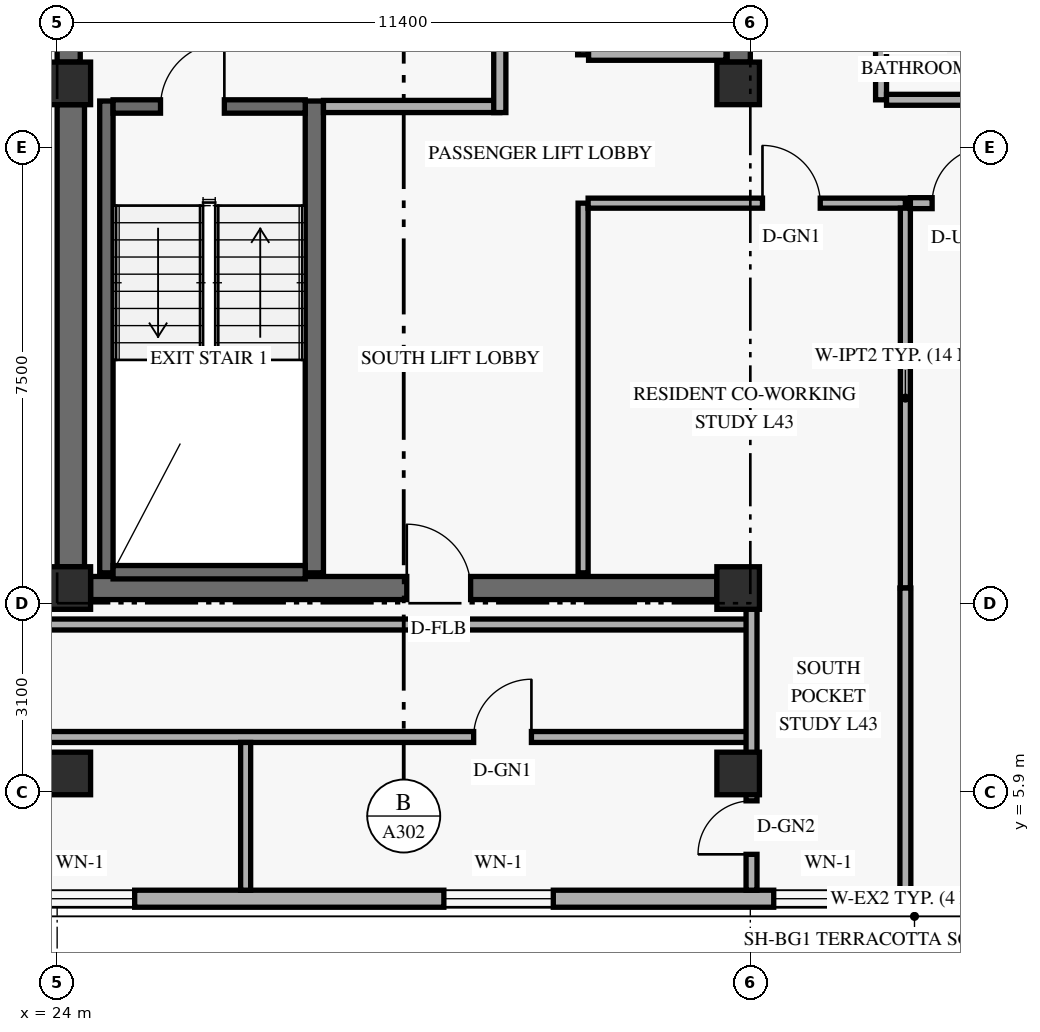
"""IFC4 building model, lengths in metres.
Left out: names, types, materials, properties, quantities, classifications, styles, units other than length and angle.
Written with IfcOpenShell. Run it as: python <this file> out.ifc"""

import sys

from ifc_helpers import new_model, si_unit, direction, frame, frame_2d, origin, origin_2d, place, context, subcontext, project, spatial, rectangle, extrude, element, fill, save


model = new_model("IFC4")
c1 = context("Model", 3, precision=1e-05, world=origin(), true_north=direction((0.0, 1.0)))
c2 = subcontext(c1, "Body", "Model", "MODEL_VIEW")
j1 = project(units=[si_unit("LENGTHUNIT", "METRE"), si_unit("PLANEANGLEUNIT", "RADIAN")], contexts=[c1])
p1 = place(None, origin())
s1 = spatial("IfcSite", under=j1, at=p1, CompositionType="ELEMENT")
p2 = place(p1, origin())
s2 = spatial("IfcBuilding", under=s1, at=p2, CompositionType="ELEMENT")
p3 = place(p2, frame((0.0, 0.0, 166.2)))
s3 = spatial("IfcBuildingStorey", under=s2, at=p3, CompositionType="ELEMENT", Elevation=166.2)
p4 = place(p3, frame((24.225, 9.6, 0.0), z_axis=(0.0, 0.0, 1.0), x_axis=(0.0, 1.0, 0.0)))
e1 = element("IfcWall", 1, at=p4, inside=s3, PredefinedType="SHEAR", context=c2, shape_type="SweptSolid", body=[
    extrude(rectangle(XDim=7.6, YDim=0.45, at=frame_2d((3.8, 0.0))), origin(), (0.0, 0.0, 1.0), 2.748),
])
p5 = place(p3, frame((24.19, 17.9, 0.0), z_axis=(0.0, 0.0, 1.0), x_axis=(0.0, 1.0, 0.0)))
e2 = element("IfcWall", 2, at=p5, inside=s3, PredefinedType="SHEAR", context=c2, shape_type="SweptSolid", body=[
    extrude(rectangle(XDim=11.95, YDim=0.38, at=frame_2d((5.975, 0.0))), origin(), (0.0, 0.0, 1.0), 2.748),
])
p6 = place(p3, frame((35.21, 17.9, 0.0), z_axis=(0.0, 0.0, 1.0), x_axis=(0.0, 1.0, 0.0)))
e3 = element("IfcWall", 3, at=p6, inside=s3, PredefinedType="SHEAR", context=c2, shape_type="SweptSolid", body=[
    extrude(rectangle(XDim=10.2, YDim=0.38, at=frame_2d((5.1, 0.0))), origin(), (0.0, 0.0, 1.0), 2.748),
])
p7 = place(p3, frame((24.55, 9.25, 0.0), z_axis=(0.0, 0.0, 1.0), x_axis=(1.0, 0.0, 0.0)))
e4 = element("IfcWall", 4, at=p7, inside=s3, PredefinedType="SHEAR", context=c2, shape_type="SweptSolid", body=[
    extrude(rectangle(XDim=10.3, YDim=0.38, at=frame_2d((5.15, 0.0))), origin(), (0.0, 0.0, 1.0), 3.36),
])
p8 = place(p7, frame((5.2, 0.0, 0.0)))
e5 = element("IfcOpeningElement", 5, at=p8, cuts=e4, PredefinedType="OPENING", context=c2, shape_type="SweptSolid", body=[
    extrude(rectangle(XDim=1.05, YDim=2.15, at=frame_2d((0.525, 1.075))), frame((0.0, 0.2, 0.0), z_axis=(0.0, -1.0, 0.0), x_axis=(1.0, 0.0, 0.0)), (0.0, 0.0, 1.0), 0.4),
])
p9 = place(p3, frame((24.81, 9.5, 0.0), z_axis=(0.0, 0.0, 1.0), x_axis=(0.0, 1.0, 0.0)))
e6 = element("IfcWall", 6, at=p9, inside=s3, PredefinedType="SHEAR", context=c2, shape_type="SweptSolid", body=[
    extrude(rectangle(XDim=7.76, YDim=0.22, at=frame_2d((3.88, 0.0))), origin(), (0.0, 0.0, 1.0), 3.36),
])
p10 = place(p3, frame((28.23, 9.5, 0.0), z_axis=(0.0, 0.0, 1.0), x_axis=(0.0, 1.0, 0.0)))
e7 = element("IfcWall", 7, at=p10, inside=s3, PredefinedType="SHEAR", context=c2, shape_type="SweptSolid", body=[
    extrude(rectangle(XDim=7.76, YDim=0.3, at=frame_2d((3.88, 0.0))), origin(), (0.0, 0.0, 1.0), 3.36),
])
p11 = place(p3, frame((24.92, 9.51, 0.0), z_axis=(0.0, 0.0, 1.0), x_axis=(1.0, 0.0, 0.0)))
e8 = element("IfcWall", 8, at=p11, inside=s3, PredefinedType="SHEAR", context=c2, shape_type="SweptSolid", body=[
    extrude(rectangle(XDim=3.16, YDim=0.22, at=frame_2d((1.58, 0.0))), origin(), (0.0, 0.0, 1.0), 3.36),
])
p12 = place(p3, frame((24.92, 17.17, 0.0), z_axis=(0.0, 0.0, 1.0), x_axis=(1.0, 0.0, 0.0)))
e9 = element("IfcWall", 9, at=p12, inside=s3, PredefinedType="SHEAR", context=c2, shape_type="SweptSolid", body=[
    extrude(rectangle(XDim=3.16, YDim=0.22, at=frame_2d((1.58, 0.0))), origin(), (0.0, 0.0, 1.0), 3.36),
])
p13 = place(p12, frame((0.78, 0.0, 0.0)))
e10 = element("IfcOpeningElement", 10, at=p13, cuts=e9, PredefinedType="OPENING", context=c2, shape_type="SweptSolid", body=[
    extrude(rectangle(XDim=1.05, YDim=2.15, at=frame_2d((0.525, 1.075))), frame((0.0, 0.12, 0.0), z_axis=(0.0, -1.0, 0.0), x_axis=(1.0, 0.0, 0.0)), (0.0, 0.0, 1.0), 0.24),
])
for number, where, z_axis, x_axis in (
    (11, (24.2, 6.2, 0.0), (0.0, 0.0, 1.0), (1.0, 0.0, 0.0)),
    (12, (24.2, 9.25, 0.0), (0.0, 0.0, 1.0), (1.0, 0.0, 0.0)),
    (13, (24.2, 17.55, 0.0), (0.0, 0.0, 1.0), (1.0, 0.0, 0.0)),
    (14, (35.2, 6.2, 0.0), (0.0, 0.0, 1.0), (1.0, 0.0, 0.0)),
    (15, (35.2, 9.25, 0.0), (0.0, 0.0, 1.0), (1.0, 0.0, 0.0)),
    (16, (35.2, 17.55, 0.0), (0.0, 0.0, 1.0), (1.0, 0.0, 0.0)),
):
    element("IfcColumn", number, at=place(p3, frame(where, z_axis=z_axis, x_axis=x_axis)), inside=s3, PredefinedType="COLUMN", context=c2, shape_type="SweptSolid", body=[
        extrude(rectangle(XDim=0.7, YDim=0.7, at=origin_2d()), origin(), (0.0, 0.0, 1.0), 3.6),
    ])
p14 = place(p3, frame((21.22, 4.14, 0.0), z_axis=(0.0, 0.0, 1.0), x_axis=(1.0, 0.0, 0.0)))
e17 = element("IfcWall", 17, at=p14, inside=s3, PredefinedType="SOLIDWALL", context=c2, shape_type="SweptSolid", body=[
    extrude(rectangle(XDim=33.76, YDim=0.28, at=frame_2d((16.88, 0.0))), origin(), (0.0, 0.0, 1.0), 3.36),
])
p15 = place(p14, frame((2.255, 0.0, 0.85)))
e18 = element("IfcOpeningElement", 18, at=p15, cuts=e17, PredefinedType="OPENING", context=c2, shape_type="SweptSolid", body=[
    extrude(rectangle(XDim=1.8, YDim=1.6, at=frame_2d((0.9, 0.8))), frame((0.0, 0.15, 0.0), z_axis=(0.0, -1.0, 0.0), x_axis=(1.0, 0.0, 0.0)), (0.0, 0.0, 1.0), 0.3),
])
p16 = place(p14, frame((9.14, 0.0, 0.85)))
e19 = element("IfcOpeningElement", 19, at=p16, cuts=e17, PredefinedType="OPENING", context=c2, shape_type="SweptSolid", body=[
    extrude(rectangle(XDim=1.8, YDim=1.6, at=frame_2d((0.9, 0.8))), frame((0.0, 0.15, 0.0), z_axis=(0.0, -1.0, 0.0), x_axis=(1.0, 0.0, 0.0)), (0.0, 0.0, 1.0), 0.3),
])
p17 = place(p14, frame((14.565, 0.0, 0.85)))
e20 = element("IfcOpeningElement", 20, at=p17, cuts=e17, PredefinedType="OPENING", context=c2, shape_type="SweptSolid", body=[
    extrude(rectangle(XDim=1.8, YDim=1.6, at=frame_2d((0.9, 0.8))), frame((0.0, 0.15, 0.0), z_axis=(0.0, -1.0, 0.0), x_axis=(1.0, 0.0, 0.0)), (0.0, 0.0, 1.0), 0.3),
])
p18 = place(p14, frame((20.088, 0.0, 0.85)))
e21 = element("IfcOpeningElement", 21, at=p18, cuts=e17, PredefinedType="OPENING", context=c2, shape_type="SweptSolid", body=[
    extrude(rectangle(XDim=1.8, YDim=1.6, at=frame_2d((0.9, 0.8))), frame((0.0, 0.15, 0.0), z_axis=(0.0, -1.0, 0.0), x_axis=(1.0, 0.0, 0.0)), (0.0, 0.0, 1.0), 0.3),
])
p19 = place(p14, frame((25.546, 0.0, 0.85)))
e22 = element("IfcOpeningElement", 22, at=p19, cuts=e17, PredefinedType="OPENING", context=c2, shape_type="SweptSolid", body=[
    extrude(rectangle(XDim=1.2, YDim=1.5, at=frame_2d((0.6, 0.75))), frame((0.0, 0.15, 0.0), z_axis=(0.0, -1.0, 0.0), x_axis=(1.0, 0.0, 0.0)), (0.0, 0.0, 1.0), 0.3),
])
p20 = place(p14, frame((29.503, 0.0, 0.85)))
e23 = element("IfcOpeningElement", 23, at=p20, cuts=e17, PredefinedType="OPENING", context=c2, shape_type="SweptSolid", body=[
    extrude(rectangle(XDim=1.8, YDim=1.6, at=frame_2d((0.9, 0.8))), frame((0.0, 0.15, 0.0), z_axis=(0.0, -1.0, 0.0), x_axis=(1.0, 0.0, 0.0)), (0.0, 0.0, 1.0), 0.3),
])
p21 = place(p3, frame((28.38, 17.17, 0.0), z_axis=(0.0, 0.0, 1.0), x_axis=(1.0, 0.0, 0.0)))
e24 = element("IfcWall", 24, at=p21, inside=s3, PredefinedType="STANDARD", context=c2, shape_type="SweptSolid", body=[
    extrude(rectangle(XDim=2.9, YDim=0.2, at=frame_2d((1.45, 0.0))), origin(), (0.0, 0.0, 1.0), 3.36),
])
p22 = place(p3, frame((31.28, 17.07, 0.0), z_axis=(0.0, 0.0, 1.0), x_axis=(0.0, 1.0, 0.0)))
e25 = element("IfcWall", 25, at=p22, inside=s3, PredefinedType="STANDARD", context=c2, shape_type="SweptSolid", body=[
    extrude(rectangle(XDim=3.92, YDim=0.2, at=frame_2d((1.96, 0.0))), origin(), (0.0, 0.0, 1.0), 2.73),
])
p23 = place(p22, frame((1.35, 0.0, 0.0)))
e26 = element("IfcOpeningElement", 26, at=p23, cuts=e25, PredefinedType="OPENING", context=c2, shape_type="SweptSolid", body=[
    extrude(rectangle(XDim=1.2, YDim=2.15, at=frame_2d((0.6, 1.075))), frame((0.0, 0.11, 0.0), z_axis=(0.0, -1.0, 0.0), x_axis=(1.0, 0.0, 0.0)), (0.0, 0.0, 1.0), 0.22),
])
p24 = place(p3, frame((32.65, 18.02, 0.0), z_axis=(0.0, 0.0, 1.0), x_axis=(0.0, 1.0, 0.0)))
e27 = element("IfcWall", 27, at=p24, inside=s3, PredefinedType="STANDARD", context=c2, shape_type="SweptSolid", body=[
    extrude(rectangle(XDim=10.06, YDim=0.18, at=frame_2d((5.03, 0.0))), origin(), (0.0, 0.0, 1.0), 3.36),
])
p25 = place(p3, frame((32.74, 18.02, 0.0), z_axis=(0.0, 0.0, 1.0), x_axis=(1.0, 0.0, 0.0)))
e28 = element("IfcWall", 28, at=p25, inside=s3, PredefinedType="STANDARD", context=c2, shape_type="SweptSolid", body=[
    extrude(rectangle(XDim=2.26, YDim=0.18, at=frame_2d((1.13, 0.0))), origin(), (0.0, 0.0, 1.0), 3.36),
])
p26 = place(p3, frame((32.65, 9.5, 0.0), z_axis=(0.0, 0.0, 1.0), x_axis=(0.0, 1.0, 0.0)))
e29 = element("IfcWall", 29, at=p26, inside=s3, PredefinedType="PARTITIONING", context=c2, shape_type="SweptSolid", body=[
    extrude(rectangle(XDim=6.08, YDim=0.165, at=frame_2d((3.04, 0.0))), origin(), (0.0, 0.0, 1.0), 3.36),
])
p27 = place(p3, frame((32.732, 15.58, 0.0), z_axis=(0.0, 0.0, 1.0), x_axis=(1.0, 0.0, 0.0)))
e30 = element("IfcWall", 30, at=p27, inside=s3, PredefinedType="PARTITIONING", context=c2, shape_type="SweptSolid", body=[
    extrude(rectangle(XDim=5.218, YDim=0.165, at=frame_2d((2.609, 0.0))), origin(), (0.0, 0.0, 1.0), 2.73),
])
p28 = place(p27, frame((2.867, 0.0, 0.0)))
e31 = element("IfcOpeningElement", 31, at=p28, cuts=e30, PredefinedType="OPENING", context=c2, shape_type="SweptSolid", body=[
    extrude(rectangle(XDim=0.95, YDim=2.15, at=frame_2d((0.475, 1.075))), frame((0.0, 0.093, 0.0), z_axis=(0.0, -1.0, 0.0), x_axis=(1.0, 0.0, 0.0)), (0.0, 0.0, 1.0), 0.185),
])
p29 = place(p3, frame((37.95, 9.25, 0.0), z_axis=(0.0, 0.0, 1.0), x_axis=(0.0, 1.0, 0.0)))
e32 = element("IfcWall", 32, at=p29, inside=s3, PredefinedType="PARTITIONING", context=c2, shape_type="SweptSolid", body=[
    extrude(rectangle(XDim=6.248, YDim=0.165, at=frame_2d((3.124, 0.0))), origin(), (0.0, 0.0, 1.0), 2.73),
])
p30 = place(p3, frame((37.55, 17.28, 0.0), z_axis=(0.0, 0.0, 1.0), x_axis=(0.0, 1.0, 0.0)))
e33 = element("IfcWall", 33, at=p30, inside=s3, PredefinedType="STANDARD", context=c2, shape_type="SweptSolid", body=[
    extrude(rectangle(XDim=10.28, YDim=0.18, at=frame_2d((5.14, 0.0))), origin(), (0.0, 0.0, 1.0), 2.73),
])
p31 = place(p30, frame((5.0, 0.0, 0.0)))
e34 = element("IfcOpeningElement", 34, at=p31, cuts=e33, PredefinedType="OPENING", context=c2, shape_type="SweptSolid", body=[
    extrude(rectangle(XDim=0.92, YDim=2.15, at=frame_2d((0.46, 1.075))), frame((0.0, 0.1, 0.0), z_axis=(0.0, -1.0, 0.0), x_axis=(1.0, 0.0, 0.0)), (0.0, 0.0, 1.0), 0.2),
])
p32 = place(p3, frame((38.032, 15.58, 0.0), z_axis=(0.0, 0.0, 1.0), x_axis=(1.0, 0.0, 0.0)))
e35 = element("IfcWall", 35, at=p32, inside=s3, PredefinedType="STANDARD", context=c2, shape_type="SweptSolid", body=[
    extrude(rectangle(XDim=8.434, YDim=0.18, at=frame_2d((4.217, 0.0))), origin(), (0.0, 0.0, 1.0), 2.73),
])
p33 = place(p32, frame((0.357, 0.0, 0.0)))
e36 = element("IfcOpeningElement", 36, at=p33, cuts=e35, PredefinedType="OPENING", context=c2, shape_type="SweptSolid", body=[
    extrude(rectangle(XDim=0.92, YDim=2.15, at=frame_2d((0.46, 1.075))), frame((0.0, 0.1, 0.0), z_axis=(0.0, -1.0, 0.0), x_axis=(1.0, 0.0, 0.0)), (0.0, 0.0, 1.0), 0.2),
])
p34 = place(p3, frame((37.64, 17.28, 0.0), z_axis=(0.0, 0.0, 1.0), x_axis=(1.0, 0.0, 0.0)))
e37 = element("IfcWall", 37, at=p34, inside=s3, PredefinedType="STANDARD", context=c2, shape_type="SweptSolid", body=[
    extrude(rectangle(XDim=8.826, YDim=0.18, at=frame_2d((4.413, 0.0))), origin(), (0.0, 0.0, 1.0), 2.73),
])
p35 = place(p3, frame((21.74, 6.8, 0.0), z_axis=(0.0, 0.0, 1.0), x_axis=(1.0, 0.0, 0.0)))
e38 = element("IfcWall", 38, at=p35, inside=s3, PredefinedType="STANDARD", context=c2, shape_type="SweptSolid", body=[
    extrude(rectangle(XDim=13.68, YDim=0.18, at=frame_2d((6.84, 0.0))), origin(), (0.0, 0.0, 1.0), 2.73),
])
p36 = place(p35, frame((0.97, 0.0, 0.0)))
e39 = element("IfcOpeningElement", 39, at=p36, cuts=e38, PredefinedType="OPENING", context=c2, shape_type="SweptSolid", body=[
    extrude(rectangle(XDim=0.95, YDim=2.15, at=frame_2d((0.475, 1.075))), frame((0.0, 0.1, 0.0), z_axis=(0.0, -1.0, 0.0), x_axis=(1.0, 0.0, 0.0)), (0.0, 0.0, 1.0), 0.2),
])
p37 = place(p35, frame((9.11, 0.0, 0.0)))
e40 = element("IfcOpeningElement", 40, at=p37, cuts=e38, PredefinedType="OPENING", context=c2, shape_type="SweptSolid", body=[
    extrude(rectangle(XDim=0.95, YDim=2.15, at=frame_2d((0.475, 1.075))), frame((0.0, 0.1, 0.0), z_axis=(0.0, -1.0, 0.0), x_axis=(1.0, 0.0, 0.0)), (0.0, 0.0, 1.0), 0.2),
])
p38 = place(p3, frame((23.85, 8.65, 0.0), z_axis=(0.0, 0.0, 1.0), x_axis=(1.0, 0.0, 0.0)))
e41 = element("IfcWall", 41, at=p38, inside=s3, PredefinedType="STANDARD", context=c2, shape_type="SweptSolid", body=[
    extrude(rectangle(XDim=11.57, YDim=0.18, at=frame_2d((5.785, 0.0))), origin(), (0.0, 0.0, 1.0), 2.73),
])
p39 = place(p3, frame((35.42, 4.28, 0.0), z_axis=(0.0, 0.0, 1.0), x_axis=(0.0, 1.0, 0.0)))
e42 = element("IfcWall", 42, at=p39, inside=s3, PredefinedType="PARTITIONING", context=c2, shape_type="SweptSolid", body=[
    extrude(rectangle(XDim=4.97, YDim=0.18, at=frame_2d((2.485, 0.0))), origin(), (0.0, 0.0, 1.0), 2.73),
])
p40 = place(p39, frame((0.59, 0.0, 0.0)))
e43 = element("IfcOpeningElement", 43, at=p40, cuts=e42, PredefinedType="OPENING", context=c2, shape_type="SweptSolid", body=[
    extrude(rectangle(XDim=0.88, YDim=2.12, at=frame_2d((0.44, 1.06))), frame((0.0, 0.1, 0.0), z_axis=(0.0, -1.0, 0.0), x_axis=(1.0, 0.0, 0.0)), (0.0, 0.0, 1.0), 0.2),
])
p41 = place(p3, frame((37.95, 4.28, 0.0), z_axis=(0.0, 0.0, 1.0), x_axis=(0.0, 1.0, 0.0)))
e44 = element("IfcWall", 44, at=p41, inside=s3, PredefinedType="PARTITIONING", context=c2, shape_type="SweptSolid", body=[
    extrude(rectangle(XDim=4.97, YDim=0.18, at=frame_2d((2.485, 0.0))), origin(), (0.0, 0.0, 1.0), 2.73),
])
p42 = place(p3, frame((27.1, 4.28, 0.0), z_axis=(0.0, 0.0, 1.0), x_axis=(0.0, 1.0, 0.0)))
e45 = element("IfcWall", 45, at=p42, inside=s3, PredefinedType="PARTITIONING", context=c2, shape_type="SweptSolid", body=[
    extrude(rectangle(XDim=2.43, YDim=0.165, at=frame_2d((1.215, 0.0))), origin(), (0.0, 0.0, 1.0), 2.879),
])
p43 = place(p15, origin())
e46 = element("IfcWindow", 46, at=p43, inside=s3, PartitioningType="SINGLE_PANEL", PredefinedType="WINDOW", context=c2, shape_type="SweptSolid", body=[
    extrude(rectangle(XDim=1.8, YDim=1.6, at=frame_2d((0.9, 0.8))), frame((0.0, 0.03, 0.0), z_axis=(0.0, -1.0, 0.0), x_axis=(1.0, 0.0, 0.0)), (0.0, 0.0, 1.0), 0.06),
])
fill(e18, e46)
p44 = place(p16, origin())
e47 = element("IfcWindow", 47, at=p44, inside=s3, PartitioningType="SINGLE_PANEL", PredefinedType="WINDOW", context=c2, shape_type="SweptSolid", body=[
    extrude(rectangle(XDim=1.8, YDim=1.6, at=frame_2d((0.9, 0.8))), frame((0.0, 0.03, 0.0), z_axis=(0.0, -1.0, 0.0), x_axis=(1.0, 0.0, 0.0)), (0.0, 0.0, 1.0), 0.06),
])
fill(e19, e47)
p45 = place(p17, origin())
e48 = element("IfcWindow", 48, at=p45, inside=s3, PartitioningType="SINGLE_PANEL", PredefinedType="WINDOW", context=c2, shape_type="SweptSolid", body=[
    extrude(rectangle(XDim=1.8, YDim=1.6, at=frame_2d((0.9, 0.8))), frame((0.0, 0.03, 0.0), z_axis=(0.0, -1.0, 0.0), x_axis=(1.0, 0.0, 0.0)), (0.0, 0.0, 1.0), 0.06),
])
fill(e20, e48)
p46 = place(p13, frame((1.05, 0.0, 0.0), z_axis=(0.0, 0.0, 1.0), x_axis=(-1.0, 0.0, 0.0)))
e49 = element("IfcDoor", 49, at=p46, inside=s3, OperationType="SINGLE_SWING_LEFT", PredefinedType="DOOR", context=c2, shape_type="SweptSolid", body=[
    extrude(rectangle(XDim=1.05, YDim=2.15, at=frame_2d((0.525, 1.075))), frame((0.0, 0.025, 0.0), z_axis=(0.0, -1.0, 0.0), x_axis=(1.0, 0.0, 0.0)), (0.0, 0.0, 1.0), 0.05),
])
fill(e10, e49)
p47 = place(p28, origin())
e50 = element("IfcDoor", 50, at=p47, inside=s3, OperationType="SINGLE_SWING_LEFT", PredefinedType="DOOR", context=c2, shape_type="SweptSolid", body=[
    extrude(rectangle(XDim=0.95, YDim=2.15, at=frame_2d((0.475, 1.075))), frame((0.0, 0.025, 0.0), z_axis=(0.0, -1.0, 0.0), x_axis=(1.0, 0.0, 0.0)), (0.0, 0.0, 1.0), 0.05),
])
fill(e31, e50)
p48 = place(p8, origin())
e51 = element("IfcDoor", 51, at=p48, inside=s3, OperationType="SINGLE_SWING_LEFT", PredefinedType="DOOR", context=c2, shape_type="SweptSolid", body=[
    extrude(rectangle(XDim=1.05, YDim=2.15, at=frame_2d((0.525, 1.075))), frame((0.0, 0.025, 0.0), z_axis=(0.0, -1.0, 0.0), x_axis=(1.0, 0.0, 0.0)), (0.0, 0.0, 1.0), 0.05),
])
fill(e5, e51)
p49 = place(p40, origin())
e52 = element("IfcDoor", 52, at=p49, inside=s3, OperationType="SINGLE_SWING_LEFT", PredefinedType="DOOR", context=c2, shape_type="SweptSolid", body=[
    extrude(rectangle(XDim=0.88, YDim=2.12, at=frame_2d((0.44, 1.06))), frame((0.0, 0.025, 0.0), z_axis=(0.0, -1.0, 0.0), x_axis=(1.0, 0.0, 0.0)), (0.0, 0.0, 1.0), 0.05),
])
fill(e43, e52)
p50 = place(p33, origin())
e53 = element("IfcDoor", 53, at=p50, inside=s3, OperationType="SINGLE_SWING_RIGHT", PredefinedType="DOOR", context=c2, shape_type="SweptSolid", body=[
    extrude(rectangle(XDim=0.92, YDim=2.15, at=frame_2d((0.46, 1.075))), frame((0.0, 0.025, 0.0), z_axis=(0.0, -1.0, 0.0), x_axis=(1.0, 0.0, 0.0)), (0.0, 0.0, 1.0), 0.05),
])
fill(e36, e53)
p51 = place(p37, origin())
e54 = element("IfcDoor", 54, at=p51, inside=s3, OperationType="SINGLE_SWING_RIGHT", PredefinedType="DOOR", context=c2, shape_type="SweptSolid", body=[
    extrude(rectangle(XDim=0.95, YDim=2.15, at=frame_2d((0.475, 1.075))), frame((0.0, 0.025, 0.0), z_axis=(0.0, -1.0, 0.0), x_axis=(1.0, 0.0, 0.0)), (0.0, 0.0, 1.0), 0.05),
])
fill(e40, e54)
save(model, sys.argv[1])
